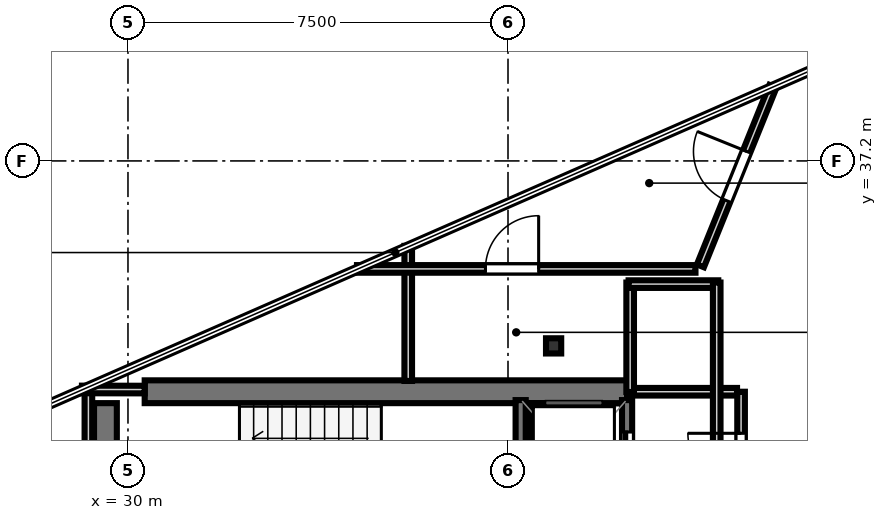
"""IFC4 building model, lengths in metres.
Left out: names, types, materials, properties, quantities, classifications, styles, units other than length and angle.
Written with IfcOpenShell. Run it as: python <this file> out.ifc"""

import sys

from ifc_helpers import new_model, si_unit, direction, frame, frame_2d, origin, origin_2d, place, context, subcontext, project, spatial, rectangle, i_section, extrude, element, fill, save


model = new_model("IFC4")
c1 = context("Model", 3, precision=1e-05, world=origin(), true_north=direction((0.0, 1.0)))
c2 = subcontext(c1, "Body", "Model", "MODEL_VIEW")
j1 = project(units=[si_unit("LENGTHUNIT", "METRE"), si_unit("PLANEANGLEUNIT", "RADIAN")], contexts=[c1])
p1 = place(None, origin())
s1 = spatial("IfcSite", under=j1, at=p1, CompositionType="ELEMENT")
p2 = place(p1, origin())
s2 = spatial("IfcBuilding", under=s1, at=p2, CompositionType="ELEMENT")
p3 = place(p2, frame((0.0, 0.0, 367.55)))
s3 = spatial("IfcBuildingStorey", under=s2, at=p3, CompositionType="ELEMENT", Elevation=367.55)
p4 = place(p3, frame((30.33, 32.645, 0.0), z_axis=(0.0, 0.0, 1.0), x_axis=(1.0, 0.0, 0.0)))
e1 = element("IfcWall", 1, at=p4, inside=s3, PredefinedType="SHEAR", context=c2, shape_type="SweptSolid", body=[
    extrude(rectangle(XDim=9.52, YDim=0.45, at=frame_2d((4.76, 0.0))), origin(), (0.0, 0.0, 1.0), 3.55),
])
for number, where, z_axis, x_axis in (
    (2, (29.555, 24.98, 0.0), (0.0, 0.0, 1.0), (0.0, 1.0, 0.0)),
    (3, (38.18, 24.98, 0.0), (0.0, 0.0, 1.0), (0.0, 1.0, 0.0)),
):
    element("IfcWall", number, at=place(p3, frame(where, z_axis=z_axis, x_axis=x_axis)), inside=s3, PredefinedType="SHEAR", context=c2, shape_type="SweptSolid", body=[
        extrude(rectangle(XDim=7.44, YDim=0.45, at=frame_2d((3.72, 0.0))), origin(), (0.0, 0.0, 1.0), 3.55),
    ])
p5 = place(p3, frame((38.4, 33.55, 0.0), z_axis=(0.0, 0.0, 1.0), x_axis=(1.0, 0.0, 0.0)))
e4 = element("IfcColumn", 4, at=p5, inside=s3, PredefinedType="COLUMN", context=c2, shape_type="SweptSolid", body=[
    extrude(i_section(OverallWidth=0.3, OverallDepth=0.3, WebThickness=0.01, FlangeThickness=0.015, at=origin_2d()), origin(), (0.0, 0.0, 1.0), 3.75),
])
p6 = place(p3, frame((39.85, 30.12, 0.0), z_axis=(0.0, 0.0, 1.0), x_axis=(0.0, 1.0, 0.0)))
e5 = element("IfcWall", 5, at=p6, inside=s3, PredefinedType="SOLIDWALL", context=c2, shape_type="SweptSolid", body=[
    extrude(rectangle(XDim=2.36, YDim=0.2, at=frame_2d((1.18, 0.0))), origin(), (0.0, 0.0, 1.0), 3.55),
])
p7 = place(p6, frame((0.63, 0.0, 0.0)))
e6 = element("IfcOpeningElement", 6, at=p7, cuts=e5, PredefinedType="OPENING", context=c2, shape_type="SweptSolid", body=[
    extrude(rectangle(XDim=1.1, YDim=2.15, at=frame_2d((0.55, 1.075))), frame((0.0, 0.11, 0.0), z_axis=(0.0, -1.0, 0.0), x_axis=(1.0, 0.0, 0.0)), (0.0, 0.0, 1.0), 0.22),
])
p8 = place(p3, frame((37.75, 30.12, 0.0), z_axis=(0.0, 0.0, 1.0), x_axis=(0.0, 1.0, 0.0)))
e7 = element("IfcWall", 7, at=p8, inside=s3, PredefinedType="SOLIDWALL", context=c2, shape_type="SweptSolid", body=[
    extrude(rectangle(XDim=2.36, YDim=0.2, at=frame_2d((1.18, 0.0))), origin(), (0.0, 0.0, 1.0), 3.55),
])
p9 = place(p3, frame((42.1, 29.85, 0.0), z_axis=(0.0, 0.0, 1.0), x_axis=(0.0, 1.0, 0.0)))
e8 = element("IfcWall", 8, at=p9, inside=s3, PredefinedType="PARTITIONING", context=c2, shape_type="SweptSolid", body=[
    extrude(rectangle(XDim=2.795, YDim=0.15, at=frame_2d((1.397, 0.0))), origin(), (0.0, 0.0, 1.0), 2.87),
])
p10 = place(p9, frame((0.925, 0.0, 0.0)))
e9 = element("IfcOpeningElement", 9, at=p10, cuts=e8, PredefinedType="OPENING", context=c2, shape_type="SweptSolid", body=[
    extrude(rectangle(XDim=1.05, YDim=2.15, at=frame_2d((0.525, 1.075))), frame((0.0, 0.085, 0.0), z_axis=(0.0, -1.0, 0.0), x_axis=(1.0, 0.0, 0.0)), (0.0, 0.0, 1.0), 0.17),
])
p11 = place(p3, frame((39.96, 32.645, 0.0), z_axis=(0.0, 0.0, 1.0), x_axis=(1.0, 0.0, 0.0)))
e10 = element("IfcWall", 10, at=p11, inside=s3, PredefinedType="PARTITIONING", context=c2, shape_type="SweptSolid", body=[
    extrude(rectangle(XDim=2.06, YDim=0.15, at=frame_2d((1.03, 0.0))), origin(), (0.0, 0.0, 1.0), 2.87),
])
p12 = place(p3, frame((39.911, 32.64, 0.0), z_axis=(0.0, 0.0, 1.0), x_axis=(0.0, 1.0, 0.0)))
e11 = element("IfcWall", 11, at=p12, inside=s3, PredefinedType="PARTITIONING", context=c2, shape_type="SweptSolid", body=[
    extrude(rectangle(XDim=2.16, YDim=0.15, at=frame_2d((1.08, 0.0))), origin(), (0.0, 0.0, 1.0), 2.87),
])
p13 = place(p3, frame((39.88, 34.769, 0.0), z_axis=(0.0, 0.0, 1.0), x_axis=(1.0, 0.0, 0.0)))
e12 = element("IfcWall", 12, at=p13, inside=s3, PredefinedType="PARTITIONING", context=c2, shape_type="SweptSolid", body=[
    extrude(rectangle(XDim=1.77, YDim=0.15, at=frame_2d((0.885, 0.0))), origin(), (0.0, 0.0, 1.0), 2.87),
])
p14 = place(p3, frame((41.619, 34.8, 0.0), z_axis=(0.0, 0.0, 1.0), x_axis=(0.0, -1.0, 0.0)))
e13 = element("IfcWall", 13, at=p14, inside=s3, PredefinedType="PARTITIONING", context=c2, shape_type="SweptSolid", body=[
    extrude(rectangle(XDim=12.75, YDim=0.15, at=frame_2d((6.375, 0.0))), origin(), (0.0, 0.0, 1.0), 2.87),
])
p15 = place(p14, frame((5.85, 0.0, 0.0)))
e14 = element("IfcOpeningElement", 14, at=p15, cuts=e13, PredefinedType="OPENING", context=c2, shape_type="SweptSolid", body=[
    extrude(rectangle(XDim=1.05, YDim=2.15, at=frame_2d((0.525, 1.075))), frame((0.0, 0.085, 0.0), z_axis=(0.0, -1.0, 0.0), x_axis=(1.0, 0.0, 0.0)), (0.0, 0.0, 1.0), 0.17),
])
p16 = place(p3, frame((35.531, 32.858, 0.0), z_axis=(0.0, 0.0, 1.0), x_axis=(0.0, 1.0, 0.0)))
e15 = element("IfcWall", 15, at=p16, inside=s3, PredefinedType="PARTITIONING", context=c2, shape_type="SweptSolid", body=[
    extrude(rectangle(XDim=2.666, YDim=0.15, at=frame_2d((1.333, 0.0))), origin(), (0.0, 0.0, 1.0), 2.87),
])
p17 = place(p3, frame((34.52, 35.069, 0.0), z_axis=(0.0, 0.0, 1.0), x_axis=(1.0, 0.0, 0.0)))
e16 = element("IfcWall", 16, at=p17, inside=s3, PredefinedType="PARTITIONING", context=c2, shape_type="SweptSolid", body=[
    extrude(rectangle(XDim=6.68, YDim=0.15, at=frame_2d((3.34, 0.0))), origin(), (0.0, 0.0, 1.0), 2.87),
])
p18 = place(p17, frame((2.535, 0.0, 0.0)))
e17 = element("IfcOpeningElement", 17, at=p18, cuts=e16, PredefinedType="OPENING", context=c2, shape_type="SweptSolid", body=[
    extrude(rectangle(XDim=1.05, YDim=2.15, at=frame_2d((0.525, 1.075))), frame((0.0, 0.085, 0.0), z_axis=(0.0, -1.0, 0.0), x_axis=(1.0, 0.0, 0.0)), (0.0, 0.0, 1.0), 0.17),
])
p19 = place(p3, frame((29.219, 32.757, 0.0), z_axis=(0.0, 0.0, 1.0), x_axis=(0.0, -1.0, 0.0)))
e18 = element("IfcWall", 18, at=p19, inside=s3, PredefinedType="PARTITIONING", context=c2, shape_type="SweptSolid", body=[
    extrude(rectangle(XDim=8.428, YDim=0.15, at=frame_2d((4.214, 0.0))), origin(), (0.0, 0.0, 1.0), 2.87),
])
p20 = place(p3, frame((41.297, 35.129, 0.0), z_axis=(0.0, 0.0, 1.0), x_axis=(0.374615121192, 0.927180409076, 0.0)))
e19 = element("IfcWall", 19, at=p20, inside=s3, PredefinedType="PARTITIONING", context=c2, shape_type="SweptSolid", body=[
    extrude(rectangle(XDim=3.822, YDim=0.15, at=frame_2d((1.911, 0.0))), origin(), (0.0, 0.0, 1.0), 2.87),
])
p21 = place(p20, frame((1.386, 0.0, 0.0)))
e20 = element("IfcOpeningElement", 20, at=p21, cuts=e19, PredefinedType="OPENING", context=c2, shape_type="SweptSolid", body=[
    extrude(rectangle(XDim=1.05, YDim=2.15, at=frame_2d((0.525, 1.075))), frame((0.0, 0.085, 0.0), z_axis=(0.0, -1.0, 0.0), x_axis=(1.0, 0.0, 0.0)), (0.0, 0.0, 1.0), 0.17),
])
p22 = place(p3, frame((30.33, 32.688, 0.0), z_axis=(0.0, 0.0, 1.0), x_axis=(-0.999998426292, 0.001774095375, 0.0)))
e21 = element("IfcWall", 21, at=p22, inside=s3, PredefinedType="PARTITIONING", context=c2, shape_type="SweptSolid", body=[
    extrude(rectangle(XDim=1.239, YDim=0.15, at=frame_2d((0.619, 0.0))), origin(), (0.0, 0.0, 1.0), 2.87),
])
p23 = place(p7, origin())
e22 = element("IfcDoor", 22, at=p23, inside=s3, OperationType="SLIDING_TO_LEFT", PredefinedType="DOOR", context=c2, shape_type="SweptSolid", body=[
    extrude(rectangle(XDim=1.1, YDim=2.15, at=frame_2d((0.55, 1.075))), frame((0.0, 0.025, 0.0), z_axis=(0.0, -1.0, 0.0), x_axis=(1.0, 0.0, 0.0)), (0.0, 0.0, 1.0), 0.05),
])
fill(e6, e22)
p24 = place(p10, origin())
e23 = element("IfcDoor", 23, at=p24, inside=s3, OperationType="SINGLE_SWING_RIGHT", PredefinedType="DOOR", context=c2, shape_type="SweptSolid", body=[
    extrude(rectangle(XDim=1.05, YDim=2.15, at=frame_2d((0.525, 1.075))), frame((0.0, 0.025, 0.0), z_axis=(0.0, -1.0, 0.0), x_axis=(1.0, 0.0, 0.0)), (0.0, 0.0, 1.0), 0.05),
])
fill(e9, e23)
p25 = place(p21, origin())
e24 = element("IfcDoor", 24, at=p25, inside=s3, OperationType="SINGLE_SWING_RIGHT", PredefinedType="DOOR", context=c2, shape_type="SweptSolid", body=[
    extrude(rectangle(XDim=1.05, YDim=2.15, at=frame_2d((0.525, 1.075))), frame((0.0, 0.025, 0.0), z_axis=(0.0, -1.0, 0.0), x_axis=(1.0, 0.0, 0.0)), (0.0, 0.0, 1.0), 0.05),
])
fill(e20, e24)
p26 = place(p18, origin())
e25 = element("IfcDoor", 25, at=p26, inside=s3, OperationType="SINGLE_SWING_RIGHT", PredefinedType="DOOR", context=c2, shape_type="SweptSolid", body=[
    extrude(rectangle(XDim=1.05, YDim=2.15, at=frame_2d((0.525, 1.075))), frame((0.0, 0.025, 0.0), z_axis=(0.0, -1.0, 0.0), x_axis=(1.0, 0.0, 0.0)), (0.0, 0.0, 1.0), 0.05),
])
fill(e17, e25)
save(model, sys.argv[1])
